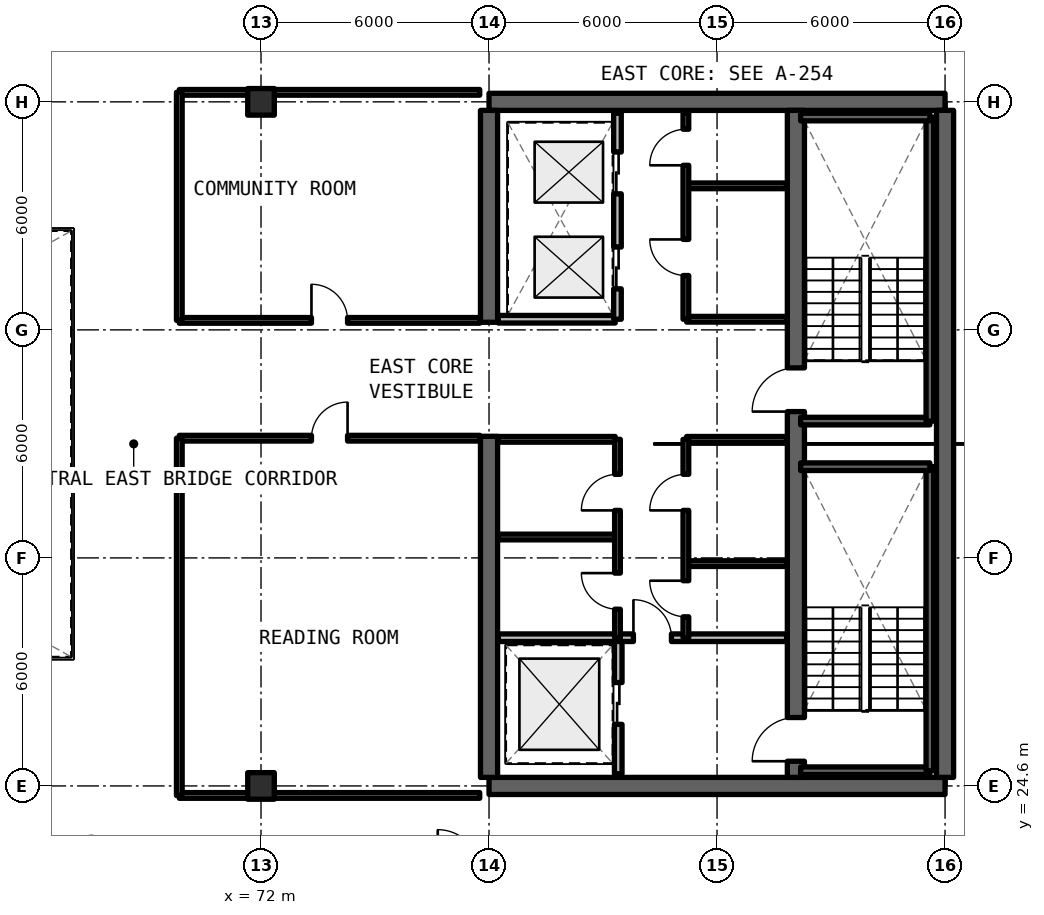
"""IFC4 building model, lengths in metres.
Left out: names, types, materials, properties, quantities, classifications, styles, units other than length and angle.
Written with IfcOpenShell. Run it as: python <this file> out.ifc"""

import sys

from ifc_helpers import new_model, si_unit, direction, frame, frame_2d, origin, origin_2d, place, context, subcontext, project, spatial, rectangle, extrude, element, fill, save


model = new_model("IFC4")
c1 = context("Model", 3, precision=1e-05, world=origin(), true_north=direction((0.0, 1.0)))
c2 = subcontext(c1, "Body", "Model", "MODEL_VIEW")
j1 = project(units=[si_unit("LENGTHUNIT", "METRE"), si_unit("PLANEANGLEUNIT", "RADIAN")], contexts=[c1])
p1 = place(None, origin())
s1 = spatial("IfcSite", under=j1, at=p1, CompositionType="ELEMENT")
p2 = place(p1, origin())
s2 = spatial("IfcBuilding", under=s1, at=p2, CompositionType="ELEMENT")
p3 = place(p2, frame((0.0, 0.0, 226.05)))
s3 = spatial("IfcBuildingStorey", under=s2, at=p3, CompositionType="ELEMENT", Elevation=226.05)
for number, where, z_axis, x_axis in (
    (1, (78.0, 24.6, 0.0), (0.0, 0.0, 1.0), (1.0, 0.0, 0.0)),
    (2, (90.0, 42.6, 0.0), (0.0, 0.0, 1.0), (-1.0, 0.0, 0.0)),
):
    element("IfcWall", number, at=place(p3, frame(where, z_axis=z_axis, x_axis=x_axis)), inside=s3, PredefinedType="SHEAR", context=c2, shape_type="SweptSolid", body=[
        extrude(rectangle(XDim=12.0, YDim=0.45, at=frame_2d((6.0, 0.0))), origin(), (0.0, 0.0, 1.0), 3.3),
    ])
p4 = place(p3, frame((90.0, 24.825, 0.0), z_axis=(0.0, 0.0, 1.0), x_axis=(0.0, 1.0, 0.0)))
e3 = element("IfcWall", 3, at=p4, inside=s3, PredefinedType="SHEAR", context=c2, shape_type="SweptSolid", body=[
    extrude(rectangle(XDim=17.55, YDim=0.45, at=frame_2d((8.775, 0.0))), origin(), (0.0, 0.0, 1.0), 3.3),
])
p5 = place(p3, frame((78.0, 24.825, 0.0), z_axis=(0.0, 0.0, 1.0), x_axis=(0.0, 1.0, 0.0)))
e4 = element("IfcWall", 4, at=p5, inside=s3, PredefinedType="SHEAR", context=c2, shape_type="SweptSolid", body=[
    extrude(rectangle(XDim=8.975, YDim=0.45, at=frame_2d((4.488, 0.0))), origin(), (0.0, 0.0, 1.0), 3.3),
])
p6 = place(p3, frame((78.0, 36.8, 0.0), z_axis=(0.0, 0.0, 1.0), x_axis=(0.0, 1.0, 0.0)))
e5 = element("IfcWall", 5, at=p6, inside=s3, PredefinedType="SHEAR", context=c2, shape_type="SweptSolid", body=[
    extrude(rectangle(XDim=5.575, YDim=0.45, at=frame_2d((2.788, 0.0))), origin(), (0.0, 0.0, 1.0), 3.3),
])
p7 = place(p3, frame((86.075, 24.825, 0.0), z_axis=(0.0, 0.0, 1.0), x_axis=(0.0, 1.0, 0.0)))
e6 = element("IfcWall", 6, at=p7, inside=s3, PredefinedType="SHEAR", context=c2, shape_type="SweptSolid", body=[
    extrude(rectangle(XDim=17.55, YDim=0.45, at=frame_2d((8.775, 0.0))), origin(), (0.0, 0.0, 1.0), 3.3),
])
p8 = place(p7, frame((0.425, 0.0, 0.0)))
e7 = element("IfcOpeningElement", 7, at=p8, cuts=e6, PredefinedType="OPENING", context=c2, shape_type="SweptSolid", body=[
    extrude(rectangle(XDim=1.15, YDim=2.15, at=frame_2d((0.575, 1.075))), frame((0.0, 0.235, 0.0), z_axis=(0.0, -1.0, 0.0), x_axis=(1.0, 0.0, 0.0)), (0.0, 0.0, 1.0), 0.47),
])
p9 = place(p7, frame((9.625, 0.0, 0.0)))
e8 = element("IfcOpeningElement", 8, at=p9, cuts=e6, PredefinedType="OPENING", context=c2, shape_type="SweptSolid", body=[
    extrude(rectangle(XDim=1.15, YDim=2.15, at=frame_2d((0.575, 1.075))), frame((0.0, 0.235, 0.0), z_axis=(0.0, -1.0, 0.0), x_axis=(1.0, 0.0, 0.0)), (0.0, 0.0, 1.0), 0.47),
])
for number, where, z_axis, x_axis in (
    (9, (72.0, 24.6, 0.0), (0.0, 0.0, 1.0), (1.0, 0.0, 0.0)),
    (10, (72.0, 42.6, 0.0), (0.0, 0.0, 1.0), (1.0, 0.0, 0.0)),
):
    element("IfcColumn", number, at=place(p3, frame(where, z_axis=z_axis, x_axis=x_axis)), inside=s3, PredefinedType="COLUMN", context=c2, shape_type="SweptSolid", body=[
        extrude(rectangle(XDim=0.7, YDim=0.7, at=origin_2d()), origin(), (0.0, 0.0, 1.0), 3.3),
    ])
p10 = place(p3, frame((81.4, 24.92, 0.0), z_axis=(0.0, 0.0, 1.0), x_axis=(0.0, 1.0, 0.0)))
e11 = element("IfcWall", 11, at=p10, inside=s3, PredefinedType="SOLIDWALL", context=c2, shape_type="SweptSolid", body=[
    extrude(rectangle(XDim=3.58, YDim=0.2, at=frame_2d((1.79, 0.0))), origin(), (0.0, 0.0, 1.0), 2.35),
])
p11 = place(p10, frame((1.3, 0.0, 0.0)))
e12 = element("IfcOpeningElement", 12, at=p11, cuts=e11, PredefinedType="OPENING", context=c2, shape_type="SweptSolid", body=[
    extrude(rectangle(XDim=1.1, YDim=2.2, at=frame_2d((0.55, 1.1))), frame((0.0, 0.11, 0.0), z_axis=(0.0, -1.0, 0.0), x_axis=(1.0, 0.0, 0.0)), (0.0, 0.0, 1.0), 0.22),
])
p12 = place(p3, frame((78.245, 28.5, 0.0), z_axis=(0.0, 0.0, 1.0), x_axis=(1.0, 0.0, 0.0)))
e13 = element("IfcWall", 13, at=p12, inside=s3, PredefinedType="SOLIDWALL", context=c2, shape_type="SweptSolid", body=[
    extrude(rectangle(XDim=7.585, YDim=0.2, at=frame_2d((3.792, 0.0))), origin(), (0.0, 0.0, 1.0), 2.35),
])
p13 = place(p12, frame((3.555, 0.0, 0.0)))
e14 = element("IfcOpeningElement", 14, at=p13, cuts=e13, PredefinedType="OPENING", context=c2, shape_type="SweptSolid", body=[
    extrude(rectangle(XDim=1.0, YDim=2.15, at=frame_2d((0.5, 1.075))), frame((0.0, 0.11, 0.0), z_axis=(0.0, -1.0, 0.0), x_axis=(1.0, 0.0, 0.0)), (0.0, 0.0, 1.0), 0.22),
])
for number, where, z_axis, x_axis in (
    (15, (83.2, 30.45, 0.0), (0.0, 0.0, 1.0), (1.0, 0.0, 0.0)),
    (16, (83.2, 33.72, 0.0), (0.0, 0.0, 1.0), (1.0, 0.0, 0.0)),
):
    element("IfcWall", number, at=place(p3, frame(where, z_axis=z_axis, x_axis=x_axis)), inside=s3, PredefinedType="SOLIDWALL", context=c2, shape_type="SweptSolid", body=[
        extrude(rectangle(XDim=2.63, YDim=0.15, at=frame_2d((1.315, 0.0))), origin(), (0.0, 0.0, 1.0), 2.35),
    ])
p14 = place(p3, frame((83.18, 28.5, 0.0), z_axis=(0.0, 0.0, 1.0), x_axis=(0.0, 1.0, 0.0)))
e17 = element("IfcWall", 17, at=p14, inside=s3, PredefinedType="SOLIDWALL", context=c2, shape_type="SweptSolid", body=[
    extrude(rectangle(XDim=5.22, YDim=0.15, at=frame_2d((2.61, 0.0))), origin(), (0.0, 0.0, 1.0), 2.35),
])
p15 = place(p14, frame((0.55, 0.0, 0.0)))
e18 = element("IfcOpeningElement", 18, at=p15, cuts=e17, PredefinedType="OPENING", context=c2, shape_type="SweptSolid", body=[
    extrude(rectangle(XDim=0.95, YDim=2.15, at=frame_2d((0.475, 1.075))), frame((0.0, 0.085, 0.0), z_axis=(0.0, -1.0, 0.0), x_axis=(1.0, 0.0, 0.0)), (0.0, 0.0, 1.0), 0.17),
])
p16 = place(p14, frame((3.35, 0.0, 0.0)))
e19 = element("IfcOpeningElement", 19, at=p16, cuts=e17, PredefinedType="OPENING", context=c2, shape_type="SweptSolid", body=[
    extrude(rectangle(XDim=0.95, YDim=2.15, at=frame_2d((0.475, 1.075))), frame((0.0, 0.085, 0.0), z_axis=(0.0, -1.0, 0.0), x_axis=(1.0, 0.0, 0.0)), (0.0, 0.0, 1.0), 0.17),
])
for number, where, z_axis, x_axis in (
    (20, (78.245, 31.15, 0.0), (0.0, 0.0, 1.0), (1.0, 0.0, 0.0)),
    (21, (78.245, 33.72, 0.0), (0.0, 0.0, 1.0), (1.0, 0.0, 0.0)),
):
    element("IfcWall", number, at=place(p3, frame(where, z_axis=z_axis, x_axis=x_axis)), inside=s3, PredefinedType="SOLIDWALL", context=c2, shape_type="SweptSolid", body=[
        extrude(rectangle(XDim=3.075, YDim=0.15, at=frame_2d((1.538, 0.0))), origin(), (0.0, 0.0, 1.0), 2.35),
    ])
p17 = place(p3, frame((81.38, 28.5, 0.0), z_axis=(0.0, 0.0, 1.0), x_axis=(0.0, 1.0, 0.0)))
e22 = element("IfcWall", 22, at=p17, inside=s3, PredefinedType="SOLIDWALL", context=c2, shape_type="SweptSolid", body=[
    extrude(rectangle(XDim=5.22, YDim=0.15, at=frame_2d((2.61, 0.0))), origin(), (0.0, 0.0, 1.0), 2.35),
])
p18 = place(p17, frame((0.75, 0.0, 0.0)))
e23 = element("IfcOpeningElement", 23, at=p18, cuts=e22, PredefinedType="OPENING", context=c2, shape_type="SweptSolid", body=[
    extrude(rectangle(XDim=0.95, YDim=2.15, at=frame_2d((0.475, 1.075))), frame((0.0, 0.085, 0.0), z_axis=(0.0, -1.0, 0.0), x_axis=(1.0, 0.0, 0.0)), (0.0, 0.0, 1.0), 0.17),
])
p19 = place(p17, frame((3.35, 0.0, 0.0)))
e24 = element("IfcOpeningElement", 24, at=p19, cuts=e22, PredefinedType="OPENING", context=c2, shape_type="SweptSolid", body=[
    extrude(rectangle(XDim=0.95, YDim=2.15, at=frame_2d((0.475, 1.075))), frame((0.0, 0.085, 0.0), z_axis=(0.0, -1.0, 0.0), x_axis=(1.0, 0.0, 0.0)), (0.0, 0.0, 1.0), 0.17),
])
for number, where, z_axis, x_axis in (
    (25, (83.2, 36.88, 0.0), (0.0, 0.0, 1.0), (1.0, 0.0, 0.0)),
    (26, (83.2, 40.39, 0.0), (0.0, 0.0, 1.0), (1.0, 0.0, 0.0)),
):
    element("IfcWall", number, at=place(p3, frame(where, z_axis=z_axis, x_axis=x_axis)), inside=s3, PredefinedType="SOLIDWALL", context=c2, shape_type="SweptSolid", body=[
        extrude(rectangle(XDim=2.63, YDim=0.15, at=frame_2d((1.315, 0.0))), origin(), (0.0, 0.0, 1.0), 2.35),
    ])
p20 = place(p3, frame((83.18, 36.88, 0.0), z_axis=(0.0, 0.0, 1.0), x_axis=(0.0, 1.0, 0.0)))
e27 = element("IfcWall", 27, at=p20, inside=s3, PredefinedType="SOLIDWALL", context=c2, shape_type="SweptSolid", body=[
    extrude(rectangle(XDim=5.42, YDim=0.15, at=frame_2d((2.71, 0.0))), origin(), (0.0, 0.0, 1.0), 2.35),
])
p21 = place(p20, frame((1.15, 0.0, 0.0)))
e28 = element("IfcOpeningElement", 28, at=p21, cuts=e27, PredefinedType="OPENING", context=c2, shape_type="SweptSolid", body=[
    extrude(rectangle(XDim=0.95, YDim=2.15, at=frame_2d((0.475, 1.075))), frame((0.0, 0.085, 0.0), z_axis=(0.0, -1.0, 0.0), x_axis=(1.0, 0.0, 0.0)), (0.0, 0.0, 1.0), 0.17),
])
p22 = place(p20, frame((4.05, 0.0, 0.0)))
e29 = element("IfcOpeningElement", 29, at=p22, cuts=e27, PredefinedType="OPENING", context=c2, shape_type="SweptSolid", body=[
    extrude(rectangle(XDim=0.95, YDim=2.15, at=frame_2d((0.475, 1.075))), frame((0.0, 0.085, 0.0), z_axis=(0.0, -1.0, 0.0), x_axis=(1.0, 0.0, 0.0)), (0.0, 0.0, 1.0), 0.17),
])
p23 = place(p3, frame((78.245, 36.88, 0.0), z_axis=(0.0, 0.0, 1.0), x_axis=(1.0, 0.0, 0.0)))
e30 = element("IfcWall", 30, at=p23, inside=s3, PredefinedType="SOLIDWALL", context=c2, shape_type="SweptSolid", body=[
    extrude(rectangle(XDim=3.075, YDim=0.2, at=frame_2d((1.538, 0.0))), origin(), (0.0, 0.0, 1.0), 2.35),
])
p24 = place(p3, frame((81.38, 36.88, 0.0), z_axis=(0.0, 0.0, 1.0), x_axis=(0.0, 1.0, 0.0)))
e31 = element("IfcWall", 31, at=p24, inside=s3, PredefinedType="SOLIDWALL", context=c2, shape_type="SweptSolid", body=[
    extrude(rectangle(XDim=5.42, YDim=0.2, at=frame_2d((2.71, 0.0))), origin(), (0.0, 0.0, 1.0), 2.35),
])
p25 = place(p24, frame((0.8, 0.0, 0.0)))
e32 = element("IfcOpeningElement", 32, at=p25, cuts=e31, PredefinedType="OPENING", context=c2, shape_type="SweptSolid", body=[
    extrude(rectangle(XDim=1.1, YDim=2.2, at=frame_2d((0.55, 1.1))), frame((0.0, 0.11, 0.0), z_axis=(0.0, -1.0, 0.0), x_axis=(1.0, 0.0, 0.0)), (0.0, 0.0, 1.0), 0.22),
])
p26 = place(p24, frame((3.3, 0.0, 0.0)))
e33 = element("IfcOpeningElement", 33, at=p26, cuts=e31, PredefinedType="OPENING", context=c2, shape_type="SweptSolid", body=[
    extrude(rectangle(XDim=1.1, YDim=2.2, at=frame_2d((0.55, 1.1))), frame((0.0, 0.11, 0.0), z_axis=(0.0, -1.0, 0.0), x_axis=(1.0, 0.0, 0.0)), (0.0, 0.0, 1.0), 0.22),
])
p27 = place(p3, frame((69.85, 24.35, 0.0), z_axis=(0.0, 0.0, 1.0), x_axis=(1.0, 0.0, 0.0)))
e34 = element("IfcWall", 34, at=p27, inside=s3, PredefinedType="SOLIDWALL", context=c2, shape_type="SweptSolid", body=[
    extrude(rectangle(XDim=7.905, YDim=0.15, at=frame_2d((3.952, 0.0))), origin(), (0.0, 0.0, 1.0), 2.35),
])
p28 = place(p3, frame((69.85, 33.75, 0.0), z_axis=(0.0, 0.0, 1.0), x_axis=(1.0, 0.0, 0.0)))
e35 = element("IfcWall", 35, at=p28, inside=s3, PredefinedType="SOLIDWALL", context=c2, shape_type="SweptSolid", body=[
    extrude(rectangle(XDim=7.905, YDim=0.15, at=frame_2d((3.952, 0.0))), origin(), (0.0, 0.0, 1.0), 2.35),
])
p29 = place(p28, frame((3.478, 0.0, 0.0)))
e36 = element("IfcOpeningElement", 36, at=p29, cuts=e35, PredefinedType="OPENING", context=c2, shape_type="SweptSolid", body=[
    extrude(rectangle(XDim=0.95, YDim=2.15, at=frame_2d((0.475, 1.075))), frame((0.0, 0.085, 0.0), z_axis=(0.0, -1.0, 0.0), x_axis=(1.0, 0.0, 0.0)), (0.0, 0.0, 1.0), 0.17),
])
p30 = place(p3, frame((69.85, 24.35, 0.0), z_axis=(0.0, 0.0, 1.0), x_axis=(0.0, 1.0, 0.0)))
e37 = element("IfcWall", 37, at=p30, inside=s3, PredefinedType="SOLIDWALL", context=c2, shape_type="SweptSolid", body=[
    extrude(rectangle(XDim=9.4, YDim=0.15, at=frame_2d((4.7, 0.0))), origin(), (0.0, 0.0, 1.0), 2.35),
])
p31 = place(p3, frame((69.85, 36.85, 0.0), z_axis=(0.0, 0.0, 1.0), x_axis=(1.0, 0.0, 0.0)))
e38 = element("IfcWall", 38, at=p31, inside=s3, PredefinedType="SOLIDWALL", context=c2, shape_type="SweptSolid", body=[
    extrude(rectangle(XDim=7.905, YDim=0.15, at=frame_2d((3.952, 0.0))), origin(), (0.0, 0.0, 1.0), 2.35),
])
p32 = place(p31, frame((3.478, 0.0, 0.0)))
e39 = element("IfcOpeningElement", 39, at=p32, cuts=e38, PredefinedType="OPENING", context=c2, shape_type="SweptSolid", body=[
    extrude(rectangle(XDim=0.95, YDim=2.15, at=frame_2d((0.475, 1.075))), frame((0.0, 0.085, 0.0), z_axis=(0.0, -1.0, 0.0), x_axis=(1.0, 0.0, 0.0)), (0.0, 0.0, 1.0), 0.17),
])
p33 = place(p3, frame((69.85, 42.85, 0.0), z_axis=(0.0, 0.0, 1.0), x_axis=(1.0, 0.0, 0.0)))
e40 = element("IfcWall", 40, at=p33, inside=s3, PredefinedType="SOLIDWALL", context=c2, shape_type="SweptSolid", body=[
    extrude(rectangle(XDim=7.905, YDim=0.15, at=frame_2d((3.952, 0.0))), origin(), (0.0, 0.0, 1.0), 2.35),
])
p34 = place(p3, frame((69.85, 36.85, 0.0), z_axis=(0.0, 0.0, 1.0), x_axis=(0.0, 1.0, 0.0)))
e41 = element("IfcWall", 41, at=p34, inside=s3, PredefinedType="SOLIDWALL", context=c2, shape_type="SweptSolid", body=[
    extrude(rectangle(XDim=6.0, YDim=0.15, at=frame_2d((3.0, 0.0))), origin(), (0.0, 0.0, 1.0), 2.35),
])
p35 = place(p3, frame((86.2, 25.0, 0.0), z_axis=(0.0, 0.0, 1.0), x_axis=(1.0, 0.0, 0.0)))
e42 = element("IfcWall", 42, at=p35, inside=s3, PredefinedType="SOLIDWALL", context=c2, shape_type="SweptSolid", body=[
    extrude(rectangle(XDim=3.4, YDim=0.2, at=frame_2d((1.7, 0.0))), origin(), (0.0, 0.0, 1.0), 3.3),
])
p36 = place(p3, frame((89.6, 25.0, 0.0), z_axis=(0.0, 0.0, 1.0), x_axis=(0.0, 1.0, 0.0)))
e43 = element("IfcWall", 43, at=p36, inside=s3, PredefinedType="SOLIDWALL", context=c2, shape_type="SweptSolid", body=[
    extrude(rectangle(XDim=8.0, YDim=0.2, at=frame_2d((4.0, 0.0))), origin(), (0.0, 0.0, 1.0), 3.3),
])
for number, where, z_axis, x_axis in (
    (44, (89.6, 33.0, 0.0), (0.0, 0.0, 1.0), (-1.0, 0.0, 0.0)),
    (45, (86.2, 34.2, 0.0), (0.0, 0.0, 1.0), (1.0, 0.0, 0.0)),
):
    element("IfcWall", number, at=place(p3, frame(where, z_axis=z_axis, x_axis=x_axis)), inside=s3, PredefinedType="SOLIDWALL", context=c2, shape_type="SweptSolid", body=[
        extrude(rectangle(XDim=3.4, YDim=0.2, at=frame_2d((1.7, 0.0))), origin(), (0.0, 0.0, 1.0), 3.3),
    ])
p37 = place(p3, frame((89.6, 34.2, 0.0), z_axis=(0.0, 0.0, 1.0), x_axis=(0.0, 1.0, 0.0)))
e46 = element("IfcWall", 46, at=p37, inside=s3, PredefinedType="SOLIDWALL", context=c2, shape_type="SweptSolid", body=[
    extrude(rectangle(XDim=8.0, YDim=0.2, at=frame_2d((4.0, 0.0))), origin(), (0.0, 0.0, 1.0), 3.3),
])
p38 = place(p3, frame((89.6, 42.2, 0.0), z_axis=(0.0, 0.0, 1.0), x_axis=(-1.0, 0.0, 0.0)))
e47 = element("IfcWall", 47, at=p38, inside=s3, PredefinedType="SOLIDWALL", context=c2, shape_type="SweptSolid", body=[
    extrude(rectangle(XDim=3.4, YDim=0.2, at=frame_2d((1.7, 0.0))), origin(), (0.0, 0.0, 1.0), 3.3),
])
p39 = place(p11, origin())
e48 = element("IfcDoor", 48, at=p39, inside=s3, OperationType="SLIDING_TO_LEFT", PredefinedType="DOOR", context=c2, shape_type="SweptSolid", body=[
    extrude(rectangle(XDim=1.1, YDim=2.2, at=frame_2d((0.55, 1.1))), frame((0.0, 0.025, 0.0), z_axis=(0.0, -1.0, 0.0), x_axis=(1.0, 0.0, 0.0)), (0.0, 0.0, 1.0), 0.05),
])
fill(e12, e48)
p40 = place(p13, origin())
e49 = element("IfcDoor", 49, at=p40, inside=s3, OperationType="SINGLE_SWING_LEFT", PredefinedType="DOOR", context=c2, shape_type="SweptSolid", body=[
    extrude(rectangle(XDim=1.0, YDim=2.15, at=frame_2d((0.5, 1.075))), frame((0.0, 0.025, 0.0), z_axis=(0.0, -1.0, 0.0), x_axis=(1.0, 0.0, 0.0)), (0.0, 0.0, 1.0), 0.05),
])
fill(e14, e49)
p41 = place(p15, origin())
e50 = element("IfcDoor", 50, at=p41, inside=s3, OperationType="SINGLE_SWING_RIGHT", PredefinedType="DOOR", context=c2, shape_type="SweptSolid", body=[
    extrude(rectangle(XDim=0.95, YDim=2.15, at=frame_2d((0.475, 1.075))), frame((0.0, 0.025, 0.0), z_axis=(0.0, -1.0, 0.0), x_axis=(1.0, 0.0, 0.0)), (0.0, 0.0, 1.0), 0.05),
])
fill(e18, e50)
p42 = place(p16, origin())
e51 = element("IfcDoor", 51, at=p42, inside=s3, OperationType="SINGLE_SWING_LEFT", PredefinedType="DOOR", context=c2, shape_type="SweptSolid", body=[
    extrude(rectangle(XDim=0.95, YDim=2.15, at=frame_2d((0.475, 1.075))), frame((0.0, 0.025, 0.0), z_axis=(0.0, -1.0, 0.0), x_axis=(1.0, 0.0, 0.0)), (0.0, 0.0, 1.0), 0.05),
])
fill(e19, e51)
p43 = place(p18, origin())
e52 = element("IfcDoor", 52, at=p43, inside=s3, OperationType="SINGLE_SWING_RIGHT", PredefinedType="DOOR", context=c2, shape_type="SweptSolid", body=[
    extrude(rectangle(XDim=0.95, YDim=2.15, at=frame_2d((0.475, 1.075))), frame((0.0, 0.025, 0.0), z_axis=(0.0, -1.0, 0.0), x_axis=(1.0, 0.0, 0.0)), (0.0, 0.0, 1.0), 0.05),
])
fill(e23, e52)
p44 = place(p19, origin())
e53 = element("IfcDoor", 53, at=p44, inside=s3, OperationType="SINGLE_SWING_LEFT", PredefinedType="DOOR", context=c2, shape_type="SweptSolid", body=[
    extrude(rectangle(XDim=0.95, YDim=2.15, at=frame_2d((0.475, 1.075))), frame((0.0, 0.025, 0.0), z_axis=(0.0, -1.0, 0.0), x_axis=(1.0, 0.0, 0.0)), (0.0, 0.0, 1.0), 0.05),
])
fill(e24, e53)
p45 = place(p21, origin())
e54 = element("IfcDoor", 54, at=p45, inside=s3, OperationType="SINGLE_SWING_RIGHT", PredefinedType="DOOR", context=c2, shape_type="SweptSolid", body=[
    extrude(rectangle(XDim=0.95, YDim=2.15, at=frame_2d((0.475, 1.075))), frame((0.0, 0.025, 0.0), z_axis=(0.0, -1.0, 0.0), x_axis=(1.0, 0.0, 0.0)), (0.0, 0.0, 1.0), 0.05),
])
fill(e28, e54)
p46 = place(p22, origin())
e55 = element("IfcDoor", 55, at=p46, inside=s3, OperationType="SINGLE_SWING_LEFT", PredefinedType="DOOR", context=c2, shape_type="SweptSolid", body=[
    extrude(rectangle(XDim=0.95, YDim=2.15, at=frame_2d((0.475, 1.075))), frame((0.0, 0.025, 0.0), z_axis=(0.0, -1.0, 0.0), x_axis=(1.0, 0.0, 0.0)), (0.0, 0.0, 1.0), 0.05),
])
fill(e29, e55)
p47 = place(p25, origin())
e56 = element("IfcDoor", 56, at=p47, inside=s3, OperationType="SLIDING_TO_LEFT", PredefinedType="DOOR", context=c2, shape_type="SweptSolid", body=[
    extrude(rectangle(XDim=1.1, YDim=2.2, at=frame_2d((0.55, 1.1))), frame((0.0, 0.025, 0.0), z_axis=(0.0, -1.0, 0.0), x_axis=(1.0, 0.0, 0.0)), (0.0, 0.0, 1.0), 0.05),
])
fill(e32, e56)
p48 = place(p26, origin())
e57 = element("IfcDoor", 57, at=p48, inside=s3, OperationType="SLIDING_TO_RIGHT", PredefinedType="DOOR", context=c2, shape_type="SweptSolid", body=[
    extrude(rectangle(XDim=1.1, YDim=2.2, at=frame_2d((0.55, 1.1))), frame((0.0, 0.025, 0.0), z_axis=(0.0, -1.0, 0.0), x_axis=(1.0, 0.0, 0.0)), (0.0, 0.0, 1.0), 0.05),
])
fill(e33, e57)
p49 = place(p29, origin())
e58 = element("IfcDoor", 58, at=p49, inside=s3, OperationType="SINGLE_SWING_RIGHT", PredefinedType="DOOR", context=c2, shape_type="SweptSolid", body=[
    extrude(rectangle(XDim=0.95, YDim=2.15, at=frame_2d((0.475, 1.075))), frame((0.0, 0.025, 0.0), z_axis=(0.0, -1.0, 0.0), x_axis=(1.0, 0.0, 0.0)), (0.0, 0.0, 1.0), 0.05),
])
fill(e36, e58)
p50 = place(p32, origin())
e59 = element("IfcDoor", 59, at=p50, inside=s3, OperationType="SINGLE_SWING_LEFT", PredefinedType="DOOR", context=c2, shape_type="SweptSolid", body=[
    extrude(rectangle(XDim=0.95, YDim=2.15, at=frame_2d((0.475, 1.075))), frame((0.0, 0.025, 0.0), z_axis=(0.0, -1.0, 0.0), x_axis=(1.0, 0.0, 0.0)), (0.0, 0.0, 1.0), 0.05),
])
fill(e39, e59)
p51 = place(p8, origin())
e60 = element("IfcDoor", 60, at=p51, inside=s3, OperationType="SINGLE_SWING_RIGHT", PredefinedType="DOOR", context=c2, shape_type="SweptSolid", body=[
    extrude(rectangle(XDim=1.15, YDim=2.15, at=frame_2d((0.575, 1.075))), frame((0.0, 0.025, 0.0), z_axis=(0.0, -1.0, 0.0), x_axis=(1.0, 0.0, 0.0)), (0.0, 0.0, 1.0), 0.05),
])
fill(e7, e60)
p52 = place(p9, origin())
e61 = element("IfcDoor", 61, at=p52, inside=s3, OperationType="SINGLE_SWING_LEFT", PredefinedType="DOOR", context=c2, shape_type="SweptSolid", body=[
    extrude(rectangle(XDim=1.15, YDim=2.15, at=frame_2d((0.575, 1.075))), frame((0.0, 0.025, 0.0), z_axis=(0.0, -1.0, 0.0), x_axis=(1.0, 0.0, 0.0)), (0.0, 0.0, 1.0), 0.05),
])
fill(e8, e61)
save(model, sys.argv[1])
